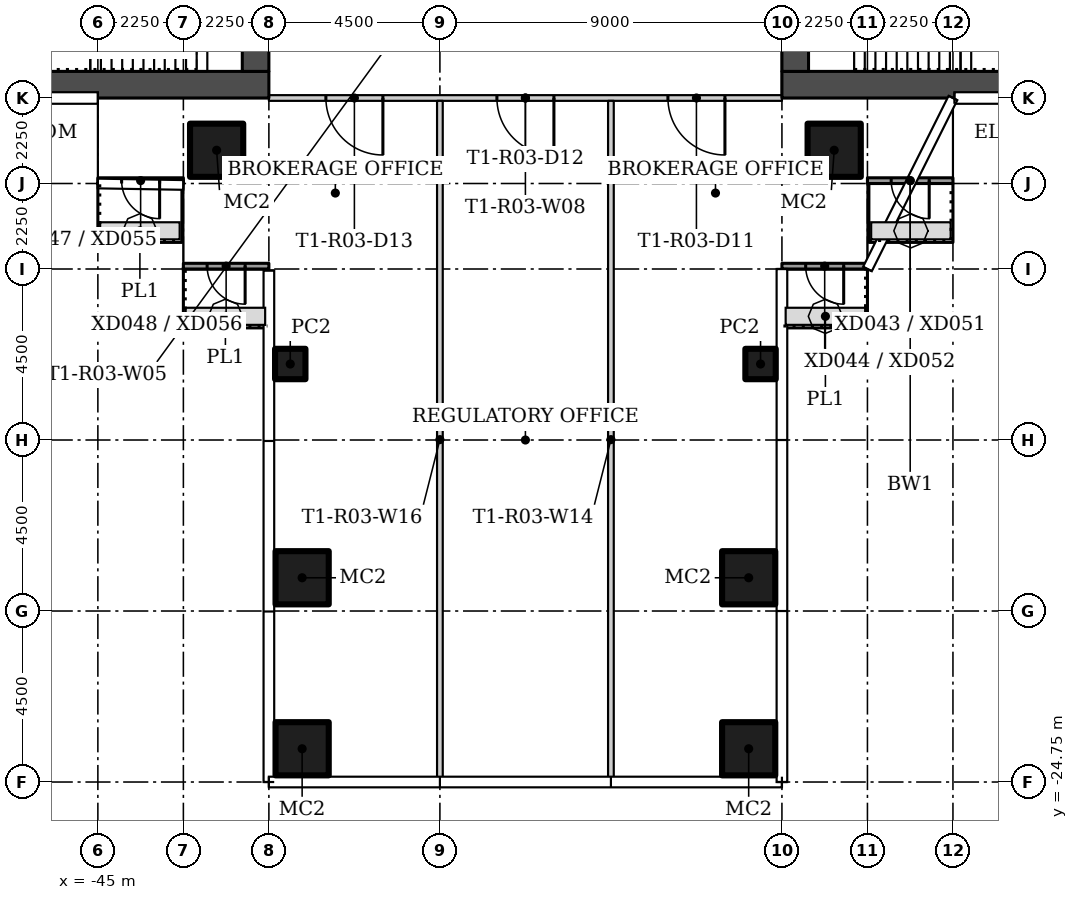
"""IFC4 building model, lengths in metres.
Left out: names, types, materials, properties, quantities, classifications, styles, units other than length and angle.
Written with IfcOpenShell. Run it as: python <this file> out.ifc"""

import sys

from ifc_helpers import new_model, si_unit, direction, frame, frame_2d, origin, origin_2d, place, context, subcontext, project, spatial, rectangle, hollow_rectangle, extrude, element, fill, save


model = new_model("IFC4")
c1 = context("Model", 3, precision=1e-05, world=origin(), true_north=direction((0.0, 1.0)))
c2 = subcontext(c1, "Body", "Model", "MODEL_VIEW")
j1 = project(units=[si_unit("LENGTHUNIT", "METRE"), si_unit("PLANEANGLEUNIT", "RADIAN")], contexts=[c1])
p1 = place(None, origin())
s1 = spatial("IfcSite", under=j1, at=p1, CompositionType="ELEMENT")
p2 = place(p1, origin())
s2 = spatial("IfcBuilding", under=s1, at=p2, CompositionType="ELEMENT")
p3 = place(p2, frame((0.0, 0.0, 42.0)))
s3 = spatial("IfcBuildingStorey", under=s2, at=p3, CompositionType="ELEMENT", Elevation=42.0)
for number, where in (
    (1, (-25.625, -8.125, 0.0)),
    (2, (-41.875, -8.125, 0.0)),
):
    element("IfcColumn", number, at=place(p3, frame(where)), inside=s3, PredefinedType="COLUMN", context=c2, shape_type="SweptSolid", body=[
        extrude(hollow_rectangle(XDim=1.4, YDim=1.4, WallThickness=0.05, at=origin_2d()), origin(), (0.0, 0.0, 1.0), 3.55),
    ])
p4 = place(p3, frame((-39.938, -13.75, 0.0)))
e3 = element("IfcColumn", 3, at=p4, inside=s3, PredefinedType="COLUMN", context=c2, shape_type="SweptSolid", body=[
    extrude(hollow_rectangle(XDim=0.8, YDim=0.8, WallThickness=0.025, at=origin_2d()), origin(), (0.0, 0.0, 1.0), 3.55),
])
for number, where in (
    (4, (-39.625, -19.375, 0.0)),
    (5, (-39.625, -23.875, 0.0)),
):
    element("IfcColumn", number, at=place(p3, frame(where)), inside=s3, PredefinedType="COLUMN", context=c2, shape_type="SweptSolid", body=[
        extrude(hollow_rectangle(XDim=1.4, YDim=1.4, WallThickness=0.05, at=origin_2d()), origin(), (0.0, 0.0, 1.0), 3.55),
    ])
p5 = place(p3, frame((-27.562, -13.75, 0.0)))
e6 = element("IfcColumn", 6, at=p5, inside=s3, PredefinedType="COLUMN", context=c2, shape_type="SweptSolid", body=[
    extrude(hollow_rectangle(XDim=0.8, YDim=0.8, WallThickness=0.025, at=origin_2d()), origin(), (0.0, 0.0, 1.0), 3.55),
])
for number, where in (
    (7, (-27.875, -19.375, 0.0)),
    (8, (-27.875, -23.875, 0.0)),
):
    element("IfcColumn", number, at=place(p3, frame(where)), inside=s3, PredefinedType="COLUMN", context=c2, shape_type="SweptSolid", body=[
        extrude(hollow_rectangle(XDim=1.4, YDim=1.4, WallThickness=0.05, at=origin_2d()), origin(), (0.0, 0.0, 1.0), 3.55),
    ])
p6 = place(p3, frame((-27.0, -6.75, 0.0), z_axis=(0.0, 0.0, 1.0), x_axis=(-1.0, 0.0, 0.0)))
e9 = element("IfcWall", 9, at=p6, inside=s3, PredefinedType="PARTITIONING", context=c2, shape_type="SweptSolid", body=[
    extrude(rectangle(XDim=13.5, YDim=0.15, at=frame_2d((6.75, 0.0))), origin(), (0.0, 0.0, 1.0), 3.55),
])
p7 = place(p6, frame((1.5, 0.0, 0.0)))
e10 = element("IfcOpeningElement", 10, at=p7, cuts=e9, PredefinedType="OPENING", context=c2, shape_type="SweptSolid", body=[
    extrude(rectangle(XDim=1.5, YDim=2.1, at=frame_2d((0.75, 1.05))), frame((0.0, 0.085, 0.0), z_axis=(0.0, -1.0, 0.0), x_axis=(1.0, 0.0, 0.0)), (0.0, 0.0, 1.0), 0.17),
])
p8 = place(p6, frame((6.0, 0.0, 0.0)))
e11 = element("IfcOpeningElement", 11, at=p8, cuts=e9, PredefinedType="OPENING", context=c2, shape_type="SweptSolid", body=[
    extrude(rectangle(XDim=1.5, YDim=2.1, at=frame_2d((0.75, 1.05))), frame((0.0, 0.085, 0.0), z_axis=(0.0, -1.0, 0.0), x_axis=(1.0, 0.0, 0.0)), (0.0, 0.0, 1.0), 0.17),
])
p9 = place(p6, frame((10.5, 0.0, 0.0)))
e12 = element("IfcOpeningElement", 12, at=p9, cuts=e9, PredefinedType="OPENING", context=c2, shape_type="SweptSolid", body=[
    extrude(rectangle(XDim=1.5, YDim=2.1, at=frame_2d((0.75, 1.05))), frame((0.0, 0.085, 0.0), z_axis=(0.0, -1.0, 0.0), x_axis=(1.0, 0.0, 0.0)), (0.0, 0.0, 1.0), 0.17),
])
for number, where, z_axis, x_axis in (
    (13, (-31.5, -24.655, 0.0), (0.0, 0.0, 1.0), (0.0, 1.0, 0.0)),
    (14, (-36.0, -24.655, 0.0), (0.0, 0.0, 1.0), (0.0, 1.0, 0.0)),
):
    element("IfcWall", number, at=place(p3, frame(where, z_axis=z_axis, x_axis=x_axis)), inside=s3, PredefinedType="PARTITIONING", context=c2, shape_type="SweptSolid", body=[
        extrude(rectangle(XDim=17.83, YDim=0.15, at=frame_2d((8.915, 0.0))), origin(), (0.0, 0.0, 1.0), 3.55),
    ])
p10 = place(p3, frame((-22.5, -8.925, 0.0), z_axis=(0.0, 0.0, 1.0), x_axis=(-1.0, 0.0, 0.0)))
e15 = element("IfcWall", 15, at=p10, inside=s3, PredefinedType="SOLIDWALL", context=c2, shape_type="SweptSolid", body=[
    extrude(rectangle(XDim=2.25, YDim=0.15, at=frame_2d((1.125, 0.0))), origin(), (0.0, 0.0, 1.0), 3.45),
])
p11 = place(p10, frame((0.625, 0.0, 0.0)))
e16 = element("IfcOpeningElement", 16, at=p11, cuts=e15, PredefinedType="OPENING", context=c2, shape_type="SweptSolid", body=[
    extrude(rectangle(XDim=1.0, YDim=2.4, at=frame_2d((0.5, 1.2))), frame((0.0, 0.085, 0.0), z_axis=(0.0, -1.0, 0.0), x_axis=(1.0, 0.0, 0.0)), (0.0, 0.0, 1.0), 0.17),
])
p12 = place(p3, frame((-24.75, -11.175, 0.0), z_axis=(0.0, 0.0, 1.0), x_axis=(-1.0, 0.0, 0.0)))
e17 = element("IfcWall", 17, at=p12, inside=s3, PredefinedType="SOLIDWALL", context=c2, shape_type="SweptSolid", body=[
    extrude(rectangle(XDim=2.25, YDim=0.15, at=frame_2d((1.125, 0.0))), origin(), (0.0, 0.0, 1.0), 3.45),
])
p13 = place(p12, frame((0.625, 0.0, 0.0)))
e18 = element("IfcOpeningElement", 18, at=p13, cuts=e17, PredefinedType="OPENING", context=c2, shape_type="SweptSolid", body=[
    extrude(rectangle(XDim=1.0, YDim=2.4, at=frame_2d((0.5, 1.2))), frame((0.0, 0.085, 0.0), z_axis=(0.0, -1.0, 0.0), x_axis=(1.0, 0.0, 0.0)), (0.0, 0.0, 1.0), 0.17),
])
p14 = place(p3, frame((-42.75, -8.925, 0.0), z_axis=(0.0, 0.0, 1.0), x_axis=(-1.0, 0.0, 0.0)))
e19 = element("IfcWall", 19, at=p14, inside=s3, PredefinedType="SOLIDWALL", context=c2, shape_type="SweptSolid", body=[
    extrude(rectangle(XDim=2.25, YDim=0.15, at=frame_2d((1.125, 0.0))), origin(), (0.0, 0.0, 1.0), 3.45),
])
p15 = place(p14, frame((0.625, 0.0, 0.0)))
e20 = element("IfcOpeningElement", 20, at=p15, cuts=e19, PredefinedType="OPENING", context=c2, shape_type="SweptSolid", body=[
    extrude(rectangle(XDim=1.0, YDim=2.4, at=frame_2d((0.5, 1.2))), frame((0.0, 0.085, 0.0), z_axis=(0.0, -1.0, 0.0), x_axis=(1.0, 0.0, 0.0)), (0.0, 0.0, 1.0), 0.17),
])
p16 = place(p3, frame((-40.5, -11.175, 0.0), z_axis=(0.0, 0.0, 1.0), x_axis=(-1.0, 0.0, 0.0)))
e21 = element("IfcWall", 21, at=p16, inside=s3, PredefinedType="SOLIDWALL", context=c2, shape_type="SweptSolid", body=[
    extrude(rectangle(XDim=2.25, YDim=0.15, at=frame_2d((1.125, 0.0))), origin(), (0.0, 0.0, 1.0), 3.45),
])
p17 = place(p16, frame((0.625, 0.0, 0.0)))
e22 = element("IfcOpeningElement", 22, at=p17, cuts=e21, PredefinedType="OPENING", context=c2, shape_type="SweptSolid", body=[
    extrude(rectangle(XDim=1.0, YDim=2.4, at=frame_2d((0.5, 1.2))), frame((0.0, 0.085, 0.0), z_axis=(0.0, -1.0, 0.0), x_axis=(1.0, 0.0, 0.0)), (0.0, 0.0, 1.0), 0.17),
])
p18 = place(p3, frame((-27.0, -6.4, 0.0)))
e23 = element("IfcWall", 23, at=p18, inside=s3, PredefinedType="SHEAR", context=c2, shape_type="SweptSolid", body=[
    extrude(rectangle(XDim=13.5, YDim=0.7, at=frame_2d((6.75, 0.0))), origin(), (0.0, 0.0, 1.0), 3.55),
])
p19 = place(p3, frame((-26.65, 6.05, 0.0), z_axis=(0.0, 0.0, 1.0), x_axis=(0.0, -1.0, 0.0)))
e24 = element("IfcWall", 24, at=p19, inside=s3, PredefinedType="SHEAR", context=c2, shape_type="SweptSolid", body=[
    extrude(rectangle(XDim=12.1, YDim=0.7, at=frame_2d((6.05, 0.0))), origin(), (0.0, 0.0, 1.0), 3.55),
])
p20 = place(p19, frame((3.9, 0.0, 0.0)))
e25 = element("IfcOpeningElement", 25, at=p20, cuts=e24, PredefinedType="OPENING", context=c2, shape_type="SweptSolid", body=[
    extrude(rectangle(XDim=1.8, YDim=2.4, at=frame_2d((0.9, 1.2))), frame((0.0, 0.36, 0.0), z_axis=(0.0, -1.0, 0.0), x_axis=(1.0, 0.0, 0.0)), (0.0, 0.0, 1.0), 0.72),
])
p21 = place(p3, frame((-40.5, -6.4, 0.0), z_axis=(0.0, 0.0, 1.0), x_axis=(-1.0, 0.0, 0.0)))
e26 = element("IfcWall", 26, at=p21, inside=s3, PredefinedType="SHEAR", context=c2, shape_type="SweptSolid", body=[
    extrude(rectangle(XDim=13.5, YDim=0.7, at=frame_2d((6.75, 0.0))), origin(), (0.0, 0.0, 1.0), 3.55),
])
p22 = place(p3, frame((-40.85, -6.05, 0.0), z_axis=(0.0, 0.0, 1.0), x_axis=(0.0, 1.0, 0.0)))
e27 = element("IfcWall", 27, at=p22, inside=s3, PredefinedType="SHEAR", context=c2, shape_type="SweptSolid", body=[
    extrude(rectangle(XDim=12.1, YDim=0.7, at=frame_2d((6.05, 0.0))), origin(), (0.0, 0.0, 1.0), 3.55),
])
p23 = place(p22, frame((6.4, 0.0, 0.0)))
e28 = element("IfcOpeningElement", 28, at=p23, cuts=e27, PredefinedType="OPENING", context=c2, shape_type="SweptSolid", body=[
    extrude(rectangle(XDim=1.8, YDim=2.4, at=frame_2d((0.9, 1.2))), frame((0.0, 0.36, 0.0), z_axis=(0.0, -1.0, 0.0), x_axis=(1.0, 0.0, 0.0)), (0.0, 0.0, 1.0), 0.72),
])
p24 = place(p7, origin())
e29 = element("IfcDoor", 29, at=p24, inside=s3, OperationType="DOUBLE_DOOR_SINGLE_SWING", PredefinedType="DOOR", context=c2, shape_type="SweptSolid", body=[
    extrude(rectangle(XDim=1.5, YDim=2.1, at=frame_2d((0.75, 1.05))), frame((0.0, 0.025, 0.0), z_axis=(0.0, -1.0, 0.0), x_axis=(1.0, 0.0, 0.0)), (0.0, 0.0, 1.0), 0.05),
])
fill(e10, e29)
p25 = place(p8, origin())
e30 = element("IfcDoor", 30, at=p25, inside=s3, OperationType="DOUBLE_DOOR_SINGLE_SWING", PredefinedType="DOOR", context=c2, shape_type="SweptSolid", body=[
    extrude(rectangle(XDim=1.5, YDim=2.1, at=frame_2d((0.75, 1.05))), frame((0.0, 0.025, 0.0), z_axis=(0.0, -1.0, 0.0), x_axis=(1.0, 0.0, 0.0)), (0.0, 0.0, 1.0), 0.05),
])
fill(e11, e30)
p26 = place(p9, origin())
e31 = element("IfcDoor", 31, at=p26, inside=s3, OperationType="DOUBLE_DOOR_SINGLE_SWING", PredefinedType="DOOR", context=c2, shape_type="SweptSolid", body=[
    extrude(rectangle(XDim=1.5, YDim=2.1, at=frame_2d((0.75, 1.05))), frame((0.0, 0.025, 0.0), z_axis=(0.0, -1.0, 0.0), x_axis=(1.0, 0.0, 0.0)), (0.0, 0.0, 1.0), 0.05),
])
fill(e12, e31)
p27 = place(p11, origin())
e32 = element("IfcDoor", 32, at=p27, inside=s3, OperationType="SINGLE_SWING_RIGHT", PredefinedType="DOOR", context=c2, shape_type="SweptSolid", body=[
    extrude(rectangle(XDim=1.0, YDim=2.4, at=frame_2d((0.5, 1.2))), frame((0.0, 0.025, 0.0), z_axis=(0.0, -1.0, 0.0), x_axis=(1.0, 0.0, 0.0)), (0.0, 0.0, 1.0), 0.05),
])
fill(e16, e32)
p28 = place(p13, origin())
e33 = element("IfcDoor", 33, at=p28, inside=s3, OperationType="SINGLE_SWING_LEFT", PredefinedType="DOOR", context=c2, shape_type="SweptSolid", body=[
    extrude(rectangle(XDim=1.0, YDim=2.4, at=frame_2d((0.5, 1.2))), frame((0.0, 0.025, 0.0), z_axis=(0.0, -1.0, 0.0), x_axis=(1.0, 0.0, 0.0)), (0.0, 0.0, 1.0), 0.05),
])
fill(e18, e33)
p29 = place(p15, origin())
e34 = element("IfcDoor", 34, at=p29, inside=s3, OperationType="SINGLE_SWING_LEFT", PredefinedType="DOOR", context=c2, shape_type="SweptSolid", body=[
    extrude(rectangle(XDim=1.0, YDim=2.4, at=frame_2d((0.5, 1.2))), frame((0.0, 0.025, 0.0), z_axis=(0.0, -1.0, 0.0), x_axis=(1.0, 0.0, 0.0)), (0.0, 0.0, 1.0), 0.05),
])
fill(e20, e34)
p30 = place(p17, origin())
e35 = element("IfcDoor", 35, at=p30, inside=s3, OperationType="SINGLE_SWING_RIGHT", PredefinedType="DOOR", context=c2, shape_type="SweptSolid", body=[
    extrude(rectangle(XDim=1.0, YDim=2.4, at=frame_2d((0.5, 1.2))), frame((0.0, 0.025, 0.0), z_axis=(0.0, -1.0, 0.0), x_axis=(1.0, 0.0, 0.0)), (0.0, 0.0, 1.0), 0.05),
])
fill(e22, e35)
save(model, sys.argv[1])
